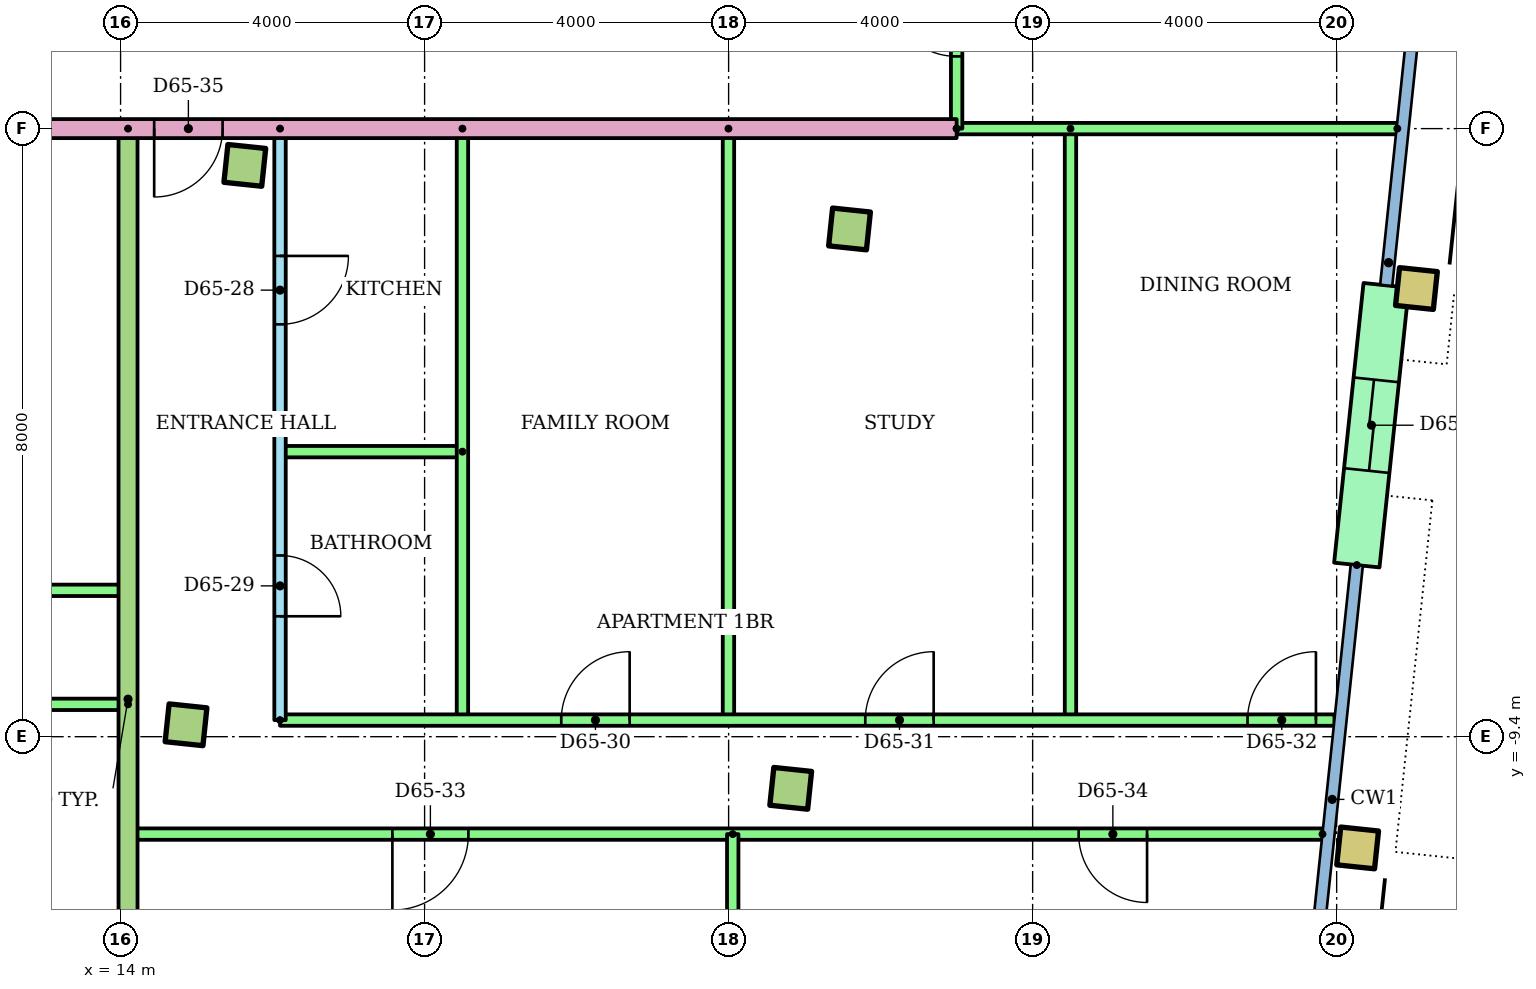
"""IFC4 building model, lengths in metres.
Left out: names, types, materials, properties, quantities, classifications, styles, units other than length and angle.
Written with IfcOpenShell. Run it as: python <this file> out.ifc"""

import sys

from ifc_helpers import new_model, si_unit, direction, frame, frame_2d, origin, origin_2d, place, context, subcontext, project, spatial, rectangle, hollow_rectangle, extrude, element, fill, save


model = new_model("IFC4")
c1 = context("Model", 3, precision=1e-05, world=origin(), true_north=direction((0.0, 1.0)))
c2 = subcontext(c1, "Body", "Model", "MODEL_VIEW")
j1 = project(units=[si_unit("LENGTHUNIT", "METRE"), si_unit("PLANEANGLEUNIT", "RADIAN")], contexts=[c1])
p1 = place(None, origin())
s1 = spatial("IfcSite", under=j1, at=p1, CompositionType="ELEMENT")
p2 = place(p1, origin())
s2 = spatial("IfcBuilding", under=s1, at=p2, CompositionType="ELEMENT")
p3 = place(p2, frame((0.0, 0.0, 253.1)))
s3 = spatial("IfcBuildingStorey", under=s2, at=p3, CompositionType="ELEMENT", Elevation=253.1)
for number, where, z_axis, x_axis in (
    (1, (14.861, -9.243, 0.0), (0.0, 0.0, 1.0), (0.995, -0.105, 0.0)),
    (2, (22.817, -10.08, 0.0), (0.0, 0.0, 1.0), (0.995, -0.105, 0.0)),
):
    element("IfcColumn", number, at=place(p3, frame(where, z_axis=z_axis, x_axis=x_axis)), inside=s3, PredefinedType="COLUMN", context=c2, shape_type="SweptSolid", body=[
        extrude(rectangle(XDim=0.5, YDim=0.5, at=origin_2d()), origin(), (0.0, 0.0, 1.0), 3.2),
    ])
p4 = place(p3, frame((30.276, -10.864, 0.0), z_axis=(0.0, 0.0, 1.0), x_axis=(0.994521895368, -0.104528463268, 0.0)))
e3 = element("IfcColumn", 3, at=p4, inside=s3, PredefinedType="COLUMN", context=c2, shape_type="SweptSolid", body=[
    extrude(hollow_rectangle(XDim=0.5, YDim=0.5, WallThickness=0.025, at=origin_2d()), origin(), (0.0, 0.0, 1.0), 3.2),
])
for number, where, z_axis, x_axis in (
    (4, (15.635, -1.884, 0.0), (0.0, 0.0, 1.0), (0.995, -0.105, 0.0)),
    (5, (23.591, -2.72, 0.0), (0.0, 0.0, 1.0), (0.995, -0.105, 0.0)),
):
    element("IfcColumn", number, at=place(p3, frame(where, z_axis=z_axis, x_axis=x_axis)), inside=s3, PredefinedType="COLUMN", context=c2, shape_type="SweptSolid", body=[
        extrude(rectangle(XDim=0.5, YDim=0.5, at=origin_2d()), origin(), (0.0, 0.0, 1.0), 3.2),
    ])
p5 = place(p3, frame((31.05, -3.504, 0.0), z_axis=(0.0, 0.0, 1.0), x_axis=(0.994521895368, -0.104528463268, 0.0)))
e6 = element("IfcColumn", 6, at=p5, inside=s3, PredefinedType="COLUMN", context=c2, shape_type="SweptSolid", body=[
    extrude(hollow_rectangle(XDim=0.5, YDim=0.5, WallThickness=0.025, at=origin_2d()), origin(), (0.0, 0.0, 1.0), 3.2),
])
p6 = place(p3, frame((30.265, -7.142, 0.0), z_axis=(0.0, 0.0, 1.0), x_axis=(0.104513052986, 0.994523514933, 0.0)))
e7 = element("IfcWall", 7, at=p6, inside=s3, PredefinedType="STANDARD", context=c2, shape_type="SweptSolid", body=[
    extrude(rectangle(XDim=3.7, YDim=0.6, at=frame_2d((1.85, 0.0))), origin(), (0.0, 0.0, 1.0), 2.92),
])
p7 = place(p6, frame((1.25, 0.0, 0.0)))
e8 = element("IfcOpeningElement", 8, at=p7, cuts=e7, PredefinedType="OPENING", context=c2, shape_type="SweptSolid", body=[
    extrude(rectangle(XDim=1.2, YDim=2.1, at=frame_2d((0.6, 1.05))), frame((0.0, 0.31, 0.0), z_axis=(0.0, -1.0, 0.0), x_axis=(1.0, 0.0, 0.0)), (0.0, 0.0, 1.0), 0.62),
])
p8 = place(p3, frame((-7.77, -7.475, 0.0)))
e9 = element("IfcWall", 9, at=p8, inside=s3, PredefinedType="PARTITIONING", context=c2, shape_type="SweptSolid", body=[
    extrude(rectangle(XDim=21.868, YDim=0.15, at=frame_2d((10.934, 0.0))), origin(), (0.0, 0.0, 1.0), 2.4),
])
p9 = place(p8, frame((5.414, 0.0, 0.0)))
e10 = element("IfcOpeningElement", 10, at=p9, cuts=e9, PredefinedType="OPENING", context=c2, shape_type="SweptSolid", body=[
    extrude(rectangle(XDim=0.9, YDim=2.1, at=frame_2d((0.45, 1.05))), frame((0.0, 0.085, 0.0), z_axis=(0.0, -1.0, 0.0), x_axis=(1.0, 0.0, 0.0)), (0.0, 0.0, 1.0), 0.17),
])
p10 = place(p8, frame((13.37, 0.0, 0.0)))
e11 = element("IfcOpeningElement", 11, at=p10, cuts=e9, PredefinedType="OPENING", context=c2, shape_type="SweptSolid", body=[
    extrude(rectangle(XDim=0.9, YDim=2.1, at=frame_2d((0.45, 1.05))), frame((0.0, 0.085, 0.0), z_axis=(0.0, -1.0, 0.0), x_axis=(1.0, 0.0, 0.0)), (0.0, 0.0, 1.0), 0.17),
])
p11 = place(p8, frame((19.059, 0.0, 0.0)))
e12 = element("IfcOpeningElement", 12, at=p11, cuts=e9, PredefinedType="OPENING", context=c2, shape_type="SweptSolid", body=[
    extrude(rectangle(XDim=0.9, YDim=2.1, at=frame_2d((0.45, 1.05))), frame((0.0, 0.085, 0.0), z_axis=(0.0, -1.0, 0.0), x_axis=(1.0, 0.0, 0.0)), (0.0, 0.0, 1.0), 0.17),
])
p12 = place(p3, frame((14.098, -8.975, 0.0), z_axis=(0.0, 0.0, 1.0), x_axis=(-1.0, 0.0, 0.0)))
e13 = element("IfcWall", 13, at=p12, inside=s3, PredefinedType="PARTITIONING", context=c2, shape_type="SweptSolid", body=[
    extrude(rectangle(XDim=23.868, YDim=0.15, at=frame_2d((11.934, 0.0))), origin(), (0.0, 0.0, 1.0), 2.4),
])
p13 = place(p12, frame((21.429, 0.0, 0.0)))
e14 = element("IfcOpeningElement", 14, at=p13, cuts=e13, PredefinedType="OPENING", context=c2, shape_type="SweptSolid", body=[
    extrude(rectangle(XDim=0.9, YDim=2.1, at=frame_2d((0.45, 1.05))), frame((0.0, 0.085, 0.0), z_axis=(0.0, -1.0, 0.0), x_axis=(1.0, 0.0, 0.0)), (0.0, 0.0, 1.0), 0.17),
])
p14 = place(p12, frame((17.451, 0.0, 0.0)))
e15 = element("IfcOpeningElement", 15, at=p14, cuts=e13, PredefinedType="OPENING", context=c2, shape_type="SweptSolid", body=[
    extrude(rectangle(XDim=0.9, YDim=2.1, at=frame_2d((0.45, 1.05))), frame((0.0, 0.085, 0.0), z_axis=(0.0, -1.0, 0.0), x_axis=(1.0, 0.0, 0.0)), (0.0, 0.0, 1.0), 0.17),
])
p15 = place(p12, frame((12.252, 0.0, 0.0)))
e16 = element("IfcOpeningElement", 16, at=p15, cuts=e13, PredefinedType="OPENING", context=c2, shape_type="SweptSolid", body=[
    extrude(rectangle(XDim=0.9, YDim=2.1, at=frame_2d((0.45, 1.05))), frame((0.0, 0.085, 0.0), z_axis=(0.0, -1.0, 0.0), x_axis=(1.0, 0.0, 0.0)), (0.0, 0.0, 1.0), 0.17),
])
p16 = place(p12, frame((9.495, 0.0, 0.0)))
e17 = element("IfcOpeningElement", 17, at=p16, cuts=e13, PredefinedType="OPENING", context=c2, shape_type="SweptSolid", body=[
    extrude(rectangle(XDim=0.9, YDim=2.1, at=frame_2d((0.45, 1.05))), frame((0.0, 0.085, 0.0), z_axis=(0.0, -1.0, 0.0), x_axis=(1.0, 0.0, 0.0)), (0.0, 0.0, 1.0), 0.17),
])
p17 = place(p12, frame((3.478, 0.0, 0.0)))
e18 = element("IfcOpeningElement", 18, at=p17, cuts=e13, PredefinedType="OPENING", context=c2, shape_type="SweptSolid", body=[
    extrude(rectangle(XDim=1.0, YDim=2.1, at=frame_2d((0.5, 1.05))), frame((0.0, 0.085, 0.0), z_axis=(0.0, -1.0, 0.0), x_axis=(1.0, 0.0, 0.0)), (0.0, 0.0, 1.0), 0.17),
])
p18 = place(p3, frame((16.098, -1.4, 0.0), z_axis=(0.0, 0.0, 1.0), x_axis=(0.0, -1.0, 0.0)))
e19 = element("IfcWall", 19, at=p18, inside=s3, PredefinedType="PARTITIONING", context=c2, shape_type="SweptSolid", body=[
    extrude(rectangle(XDim=7.782, YDim=0.15, at=frame_2d((3.891, 0.0))), origin(), (0.0, 0.0, 1.0), 2.4),
])
p19 = place(p18, frame((1.675, 0.0, 0.0)))
e20 = element("IfcOpeningElement", 20, at=p19, cuts=e19, PredefinedType="OPENING", context=c2, shape_type="SweptSolid", body=[
    extrude(rectangle(XDim=0.9, YDim=2.1, at=frame_2d((0.45, 1.05))), frame((0.0, 0.085, 0.0), z_axis=(0.0, -1.0, 0.0), x_axis=(1.0, 0.0, 0.0)), (0.0, 0.0, 1.0), 0.17),
])
p20 = place(p18, frame((5.616, 0.0, 0.0)))
e21 = element("IfcOpeningElement", 21, at=p20, cuts=e19, PredefinedType="OPENING", context=c2, shape_type="SweptSolid", body=[
    extrude(rectangle(XDim=0.8, YDim=2.1, at=frame_2d((0.4, 1.05))), frame((0.0, 0.085, 0.0), z_axis=(0.0, -1.0, 0.0), x_axis=(1.0, 0.0, 0.0)), (0.0, 0.0, 1.0), 0.17),
])
p21 = place(p3, frame((18.498, -5.65, 0.0), z_axis=(0.0, 0.0, 1.0), x_axis=(-1.0, 0.0, 0.0)))
e22 = element("IfcWall", 22, at=p21, inside=s3, PredefinedType="PARTITIONING", context=c2, shape_type="SweptSolid", body=[
    extrude(rectangle(XDim=2.4, YDim=0.15, at=frame_2d((1.2, 0.0))), origin(), (0.0, 0.0, 1.0), 2.4),
])
for number, where, z_axis, x_axis in (
    (23, (18.498, -1.4, 0.0), (0.0, 0.0, 1.0), (0.0, -1.0, 0.0)),
    (24, (21.998, -1.4, 0.0), (0.0, 0.0, 1.0), (0.0, -1.0, 0.0)),
    (25, (26.498, -1.4, 0.0), (0.0, 0.0, 1.0), (0.0, -1.0, 0.0)),
):
    element("IfcWall", number, at=place(p3, frame(where, z_axis=z_axis, x_axis=x_axis)), inside=s3, PredefinedType="PARTITIONING", context=c2, shape_type="SweptSolid", body=[
        extrude(rectangle(XDim=7.782, YDim=0.15, at=frame_2d((3.891, 0.0))), origin(), (0.0, 0.0, 1.0), 2.4),
    ])
p22 = place(p3, frame((16.098, -9.182, 0.0)))
e26 = element("IfcWall", 26, at=p22, inside=s3, PredefinedType="PARTITIONING", context=c2, shape_type="SweptSolid", body=[
    extrude(rectangle(XDim=13.873, YDim=0.15, at=frame_2d((6.937, 0.0))), origin(), (0.0, 0.0, 1.0), 2.4),
])
p23 = place(p22, frame((3.7, 0.0, 0.0)))
e27 = element("IfcOpeningElement", 27, at=p23, cuts=e26, PredefinedType="OPENING", context=c2, shape_type="SweptSolid", body=[
    extrude(rectangle(XDim=0.9, YDim=2.1, at=frame_2d((0.45, 1.05))), frame((0.0, 0.085, 0.0), z_axis=(0.0, -1.0, 0.0), x_axis=(1.0, 0.0, 0.0)), (0.0, 0.0, 1.0), 0.17),
])
p24 = place(p22, frame((7.7, 0.0, 0.0)))
e28 = element("IfcOpeningElement", 28, at=p24, cuts=e26, PredefinedType="OPENING", context=c2, shape_type="SweptSolid", body=[
    extrude(rectangle(XDim=0.9, YDim=2.1, at=frame_2d((0.45, 1.05))), frame((0.0, 0.085, 0.0), z_axis=(0.0, -1.0, 0.0), x_axis=(1.0, 0.0, 0.0)), (0.0, 0.0, 1.0), 0.17),
])
p25 = place(p22, frame((12.729, 0.0, 0.0)))
e29 = element("IfcOpeningElement", 29, at=p25, cuts=e26, PredefinedType="OPENING", context=c2, shape_type="SweptSolid", body=[
    extrude(rectangle(XDim=0.9, YDim=2.1, at=frame_2d((0.45, 1.05))), frame((0.0, 0.085, 0.0), z_axis=(0.0, -1.0, 0.0), x_axis=(1.0, 0.0, 0.0)), (0.0, 0.0, 1.0), 0.17),
])
p26 = place(p3, frame((29.814, -10.682, 0.0), z_axis=(0.0, 0.0, 1.0), x_axis=(-1.0, 0.0, 0.0)))
e30 = element("IfcWall", 30, at=p26, inside=s3, PredefinedType="PARTITIONING", context=c2, shape_type="SweptSolid", body=[
    extrude(rectangle(XDim=15.716, YDim=0.15, at=frame_2d((7.858, 0.0))), origin(), (0.0, 0.0, 1.0), 2.4),
])
p27 = place(p26, frame((11.238, 0.0, 0.0)))
e31 = element("IfcOpeningElement", 31, at=p27, cuts=e30, PredefinedType="OPENING", context=c2, shape_type="SweptSolid", body=[
    extrude(rectangle(XDim=1.0, YDim=2.1, at=frame_2d((0.5, 1.05))), frame((0.0, 0.085, 0.0), z_axis=(0.0, -1.0, 0.0), x_axis=(1.0, 0.0, 0.0)), (0.0, 0.0, 1.0), 0.17),
])
p28 = place(p26, frame((2.308, 0.0, 0.0)))
e32 = element("IfcOpeningElement", 32, at=p28, cuts=e30, PredefinedType="OPENING", context=c2, shape_type="SweptSolid", body=[
    extrude(rectangle(XDim=0.9, YDim=2.1, at=frame_2d((0.45, 1.05))), frame((0.0, 0.085, 0.0), z_axis=(0.0, -1.0, 0.0), x_axis=(1.0, 0.0, 0.0)), (0.0, 0.0, 1.0), 0.17),
])
p29 = place(p3, frame((22.054, -10.682, 0.0), z_axis=(0.0, 0.0, 1.0), x_axis=(0.0, -1.0, 0.0)))
e33 = element("IfcWall", 33, at=p29, inside=s3, PredefinedType="PARTITIONING", context=c2, shape_type="SweptSolid", body=[
    extrude(rectangle(XDim=6.567, YDim=0.15, at=frame_2d((3.284, 0.0))), origin(), (0.0, 0.0, 1.0), 2.4),
])
p30 = place(p3, frame((14.098, -1.4, 0.0), z_axis=(0.0, 0.0, 1.0), x_axis=(0.0, -1.0, 0.0)))
e34 = element("IfcWall", 34, at=p30, inside=s3, PredefinedType="PARTITIONING", context=c2, shape_type="SweptSolid", body=[
    extrude(rectangle(XDim=15.013, YDim=0.25, at=frame_2d((7.506, 0.0))), origin(), (0.0, 0.0, 1.0), 2.4),
])
p31 = place(p3, frame((25.0, -1.4, 0.0), z_axis=(0.0, 0.0, 1.0), x_axis=(-1.0, 0.0, 0.0)))
e35 = element("IfcWall", 35, at=p31, inside=s3, PredefinedType="PARTITIONING", context=c2, shape_type="SweptSolid", body=[
    extrude(rectangle(XDim=15.0, YDim=0.25, at=frame_2d((7.5, 0.0))), origin(), (0.0, 0.0, 1.0), 2.4),
])
p32 = place(p31, frame((9.658, 0.0, 0.0)))
e36 = element("IfcOpeningElement", 36, at=p32, cuts=e35, PredefinedType="OPENING", context=c2, shape_type="SweptSolid", body=[
    extrude(rectangle(XDim=0.9, YDim=2.1, at=frame_2d((0.45, 1.05))), frame((0.0, 0.135, 0.0), z_axis=(0.0, -1.0, 0.0), x_axis=(1.0, 0.0, 0.0)), (0.0, 0.0, 1.0), 0.27),
])
p33 = place(p3, frame((30.798, -1.4, 0.0), z_axis=(0.0, 0.0, 1.0), x_axis=(-1.0, 0.0, 0.0)))
e37 = element("IfcWall", 37, at=p33, inside=s3, PredefinedType="PARTITIONING", context=c2, shape_type="SweptSolid", body=[
    extrude(rectangle(XDim=5.798, YDim=0.15, at=frame_2d((2.899, 0.0))), origin(), (0.0, 0.0, 1.0), 2.4),
])
p34 = place(p3, frame((25.0, -1.4, 0.0), z_axis=(0.0, 0.0, 1.0), x_axis=(0.0, 1.0, 0.0)))
e38 = element("IfcWall", 38, at=p34, inside=s3, PredefinedType="PARTITIONING", context=c2, shape_type="SweptSolid", body=[
    extrude(rectangle(XDim=2.8, YDim=0.15, at=frame_2d((1.4, 0.0))), origin(), (0.0, 0.0, 1.0), 2.4),
])
p35 = place(p34, frame((0.95, 0.0, 0.0)))
e39 = element("IfcOpeningElement", 39, at=p35, cuts=e38, PredefinedType="OPENING", context=c2, shape_type="SweptSolid", body=[
    extrude(rectangle(XDim=0.9, YDim=2.1, at=frame_2d((0.45, 1.05))), frame((0.0, 0.085, 0.0), z_axis=(0.0, -1.0, 0.0), x_axis=(1.0, 0.0, 0.0)), (0.0, 0.0, 1.0), 0.17),
])
p36 = place(p19, origin())
e40 = element("IfcDoor", 40, at=p36, inside=s3, OperationType="SINGLE_SWING_LEFT", PredefinedType="DOOR", context=c2, shape_type="SweptSolid", body=[
    extrude(rectangle(XDim=0.9, YDim=2.1, at=frame_2d((0.45, 1.05))), frame((0.0, 0.025, 0.0), z_axis=(0.0, -1.0, 0.0), x_axis=(1.0, 0.0, 0.0)), (0.0, 0.0, 1.0), 0.05),
])
fill(e20, e40)
p37 = place(p20, origin())
e41 = element("IfcDoor", 41, at=p37, inside=s3, OperationType="SINGLE_SWING_RIGHT", PredefinedType="DOOR", context=c2, shape_type="SweptSolid", body=[
    extrude(rectangle(XDim=0.8, YDim=2.1, at=frame_2d((0.4, 1.05))), frame((0.0, 0.025, 0.0), z_axis=(0.0, -1.0, 0.0), x_axis=(1.0, 0.0, 0.0)), (0.0, 0.0, 1.0), 0.05),
])
fill(e21, e41)
p38 = place(p23, origin())
e42 = element("IfcDoor", 42, at=p38, inside=s3, OperationType="SINGLE_SWING_RIGHT", PredefinedType="DOOR", context=c2, shape_type="SweptSolid", body=[
    extrude(rectangle(XDim=0.9, YDim=2.1, at=frame_2d((0.45, 1.05))), frame((0.0, 0.025, 0.0), z_axis=(0.0, -1.0, 0.0), x_axis=(1.0, 0.0, 0.0)), (0.0, 0.0, 1.0), 0.05),
])
fill(e27, e42)
p39 = place(p24, origin())
e43 = element("IfcDoor", 43, at=p39, inside=s3, OperationType="SINGLE_SWING_RIGHT", PredefinedType="DOOR", context=c2, shape_type="SweptSolid", body=[
    extrude(rectangle(XDim=0.9, YDim=2.1, at=frame_2d((0.45, 1.05))), frame((0.0, 0.025, 0.0), z_axis=(0.0, -1.0, 0.0), x_axis=(1.0, 0.0, 0.0)), (0.0, 0.0, 1.0), 0.05),
])
fill(e28, e43)
p40 = place(p25, origin())
e44 = element("IfcDoor", 44, at=p40, inside=s3, OperationType="SINGLE_SWING_RIGHT", PredefinedType="DOOR", context=c2, shape_type="SweptSolid", body=[
    extrude(rectangle(XDim=0.9, YDim=2.1, at=frame_2d((0.45, 1.05))), frame((0.0, 0.025, 0.0), z_axis=(0.0, -1.0, 0.0), x_axis=(1.0, 0.0, 0.0)), (0.0, 0.0, 1.0), 0.05),
])
fill(e29, e44)
p41 = place(p27, origin())
e45 = element("IfcDoor", 45, at=p41, inside=s3, OperationType="SINGLE_SWING_RIGHT", PredefinedType="DOOR", context=c2, shape_type="SweptSolid", body=[
    extrude(rectangle(XDim=1.0, YDim=2.1, at=frame_2d((0.5, 1.05))), frame((0.0, 0.025, 0.0), z_axis=(0.0, -1.0, 0.0), x_axis=(1.0, 0.0, 0.0)), (0.0, 0.0, 1.0), 0.05),
])
fill(e31, e45)
p42 = place(p28, origin())
e46 = element("IfcDoor", 46, at=p42, inside=s3, OperationType="SINGLE_SWING_LEFT", PredefinedType="DOOR", context=c2, shape_type="SweptSolid", body=[
    extrude(rectangle(XDim=0.9, YDim=2.1, at=frame_2d((0.45, 1.05))), frame((0.0, 0.025, 0.0), z_axis=(0.0, -1.0, 0.0), x_axis=(1.0, 0.0, 0.0)), (0.0, 0.0, 1.0), 0.05),
])
fill(e32, e46)
p43 = place(p32, origin())
e47 = element("IfcDoor", 47, at=p43, inside=s3, OperationType="SINGLE_SWING_RIGHT", PredefinedType="DOOR", context=c2, shape_type="SweptSolid", body=[
    extrude(rectangle(XDim=0.9, YDim=2.1, at=frame_2d((0.45, 1.05))), frame((0.0, 0.025, 0.0), z_axis=(0.0, -1.0, 0.0), x_axis=(1.0, 0.0, 0.0)), (0.0, 0.0, 1.0), 0.05),
])
fill(e36, e47)
p44 = place(p35, origin())
e48 = element("IfcDoor", 48, at=p44, inside=s3, OperationType="SINGLE_SWING_RIGHT", PredefinedType="DOOR", context=c2, shape_type="SweptSolid", body=[
    extrude(rectangle(XDim=0.9, YDim=2.1, at=frame_2d((0.45, 1.05))), frame((0.0, 0.025, 0.0), z_axis=(0.0, -1.0, 0.0), x_axis=(1.0, 0.0, 0.0)), (0.0, 0.0, 1.0), 0.05),
])
fill(e39, e48)
p45 = place(p7, origin())
e49 = element("IfcDoor", 49, at=p45, inside=s3, OperationType="SLIDING_TO_LEFT", PredefinedType="DOOR", context=c2, shape_type="SweptSolid", body=[
    extrude(rectangle(XDim=1.2, YDim=2.1, at=frame_2d((0.6, 1.05))), frame((0.0, 0.025, 0.0), z_axis=(0.0, -1.0, 0.0), x_axis=(1.0, 0.0, 0.0)), (0.0, 0.0, 1.0), 0.05),
])
fill(e8, e49)
save(model, sys.argv[1])
